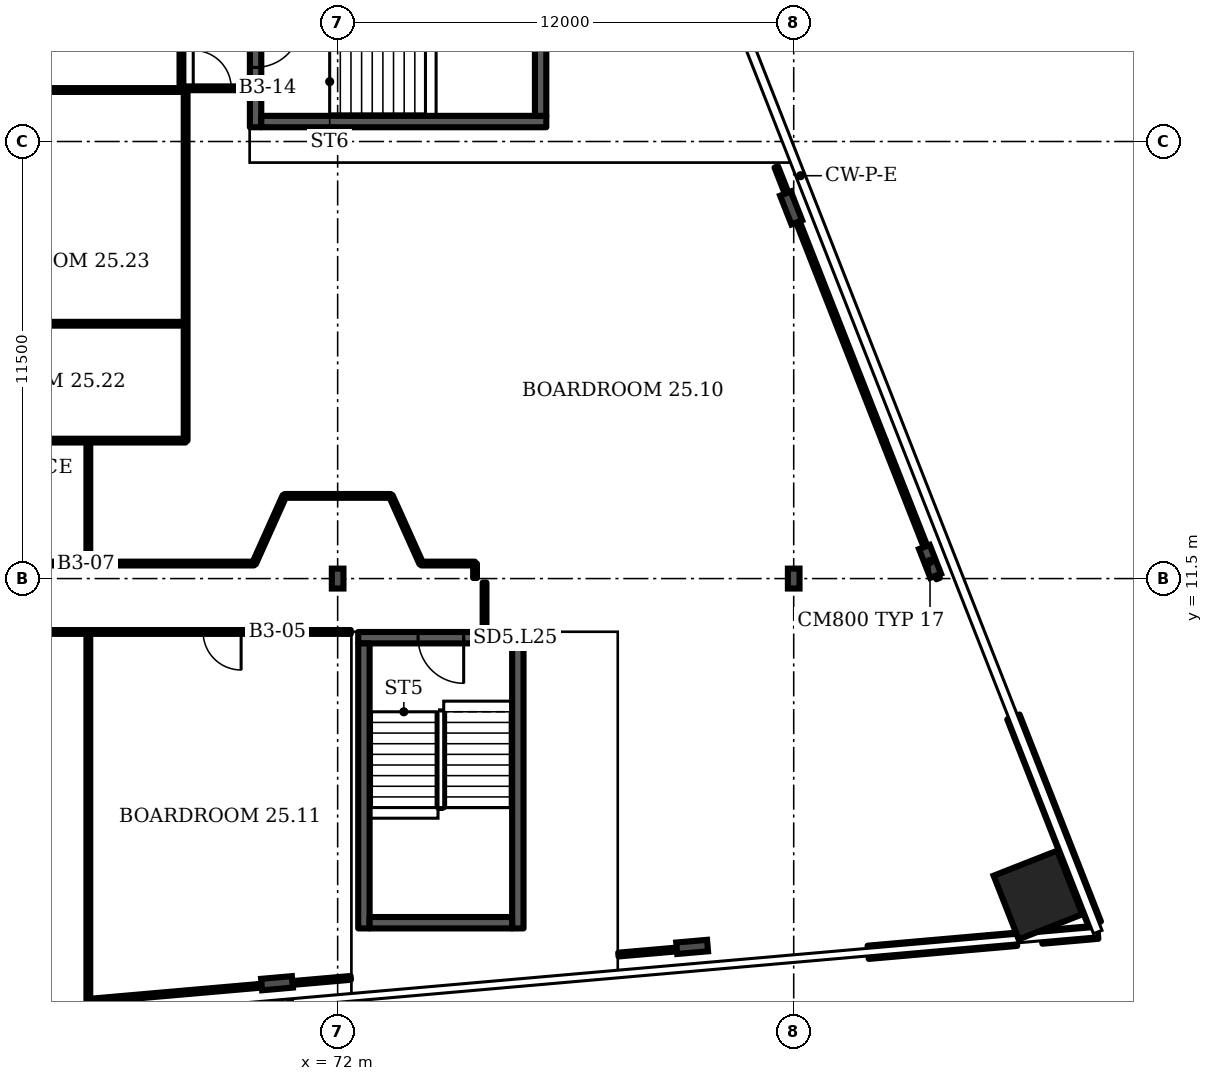
"""IFC4 building model, lengths in metres.
Left out: names, types, materials, properties, quantities, classifications, styles, units other than length and angle.
Written with IfcOpenShell. Run it as: python <this file> out.ifc"""

import sys

from ifc_helpers import new_model, si_unit, direction, frame, frame_2d, origin, origin_2d, place, context, subcontext, project, spatial, rectangle, i_section, extrude, element, fill, save


model = new_model("IFC4")
c1 = context("Model", 3, precision=1e-05, world=origin(), true_north=direction((0.0, 1.0)))
c2 = subcontext(c1, "Body", "Model", "MODEL_VIEW")
j1 = project(units=[si_unit("LENGTHUNIT", "METRE"), si_unit("PLANEANGLEUNIT", "RADIAN")], contexts=[c1])
p1 = place(None, origin())
s1 = spatial("IfcSite", under=j1, at=p1, CompositionType="ELEMENT")
p2 = place(p1, origin())
s2 = spatial("IfcBuilding", under=s1, at=p2, CompositionType="ELEMENT")
p3 = place(p2, frame((0.0, 0.0, 111.1)))
s3 = spatial("IfcBuildingStorey", under=s2, at=p3, CompositionType="ELEMENT", Elevation=111.1)
p4 = place(p3, frame((90.427, 3.174, 0.0), z_axis=(0.0, 0.0, 1.0), x_axis=(-0.365778, 0.930702, 0.0)))
e1 = element("IfcColumn", 1, at=p4, inside=s3, PredefinedType="COLUMN", context=c2, shape_type="SweptSolid", body=[
    extrude(rectangle(XDim=1.8, YDim=1.8, at=origin_2d()), origin(), (0.0, 0.0, 1.0), 3.6),
])
for number, where, z_axis, x_axis in (
    (2, (70.404, 0.853, 0.0), (0.0, 0.0, 1.0), (0.087, -0.996, 0.0)),
    (3, (81.328, 1.808, 0.0), (0.0, 0.0, 1.0), (0.087, -0.996, 0.0)),
    (4, (87.587, 11.952, 0.0), (0.0, 0.0, 1.0), (0.931, 0.366, 0.0)),
    (5, (83.933, 21.251, 0.0), (0.0, 0.0, 1.0), (0.931, 0.366, 0.0)),
):
    element("IfcColumn", number, at=place(p3, frame(where, z_axis=z_axis, x_axis=x_axis)), inside=s3, PredefinedType="COLUMN", context=c2, shape_type="SweptSolid", body=[
        extrude(i_section(OverallWidth=0.303, OverallDepth=0.814, WebThickness=0.021, FlangeThickness=0.04, FilletRadius=0.03, at=origin_2d()), origin(), (0.0, 0.0, 1.0), 3.6),
    ])
for number, where, z_axis, x_axis in (
    (6, (72.0, 11.5, 0.0), (0.0, 0.0, 1.0), (1.0, 0.0, 0.0)),
    (7, (84.0, 11.5, 0.0), (0.0, 0.0, 1.0), (1.0, 0.0, 0.0)),
):
    element("IfcColumn", number, at=place(p3, frame(where, z_axis=z_axis, x_axis=x_axis)), inside=s3, PredefinedType="COLUMN", context=c2, shape_type="SweptSolid", body=[
        extrude(i_section(OverallWidth=0.306, OverallDepth=0.524, WebThickness=0.021, FlangeThickness=0.04, FilletRadius=0.027, at=origin_2d()), origin(), (0.0, 0.0, 1.0), 3.6),
    ])
p5 = place(p3, frame((85.959, 1.667, 0.0), z_axis=(0.0, 0.0, 1.0), x_axis=(0.996194, 0.087167, 0.0)))
e8 = element("IfcWall", 8, at=p5, inside=s3, PredefinedType="SOLIDWALL", context=c2, shape_type="SweptSolid", body=[
    extrude(rectangle(XDim=3.921, YDim=0.35, at=frame_2d((1.96, 0.0))), origin(), (0.0, 0.0, 1.0), 1.0),
])
p6 = place(p3, frame((90.527, 2.066, 0.0), z_axis=(0.0, 0.0, 1.0), x_axis=(0.996198, 0.087157, 0.0)))
e9 = element("IfcWall", 9, at=p6, inside=s3, PredefinedType="SOLIDWALL", context=c2, shape_type="SweptSolid", body=[
    extrude(rectangle(XDim=1.479, YDim=0.35, at=frame_2d((0.74, 0.0))), origin(), (0.0, 0.0, 1.0), 1.0),
])
p7 = place(p3, frame((91.921, 2.414, 0.0), z_axis=(0.0, 0.0, 1.0), x_axis=(-0.36578, 0.930701, 0.0)))
e10 = element("IfcWall", 10, at=p7, inside=s3, PredefinedType="SOLIDWALL", context=c2, shape_type="SweptSolid", body=[
    extrude(rectangle(XDim=5.852, YDim=0.35, at=frame_2d((2.926, 0.0))), origin(), (0.0, 0.0, 1.0), 1.0),
])
p8 = place(p3, frame((72.541, 9.945, 0.0), z_axis=(0.0, 0.0, 1.0), x_axis=(1.0, 0.0, 0.0)))
e11 = element("IfcWall", 11, at=p8, inside=s3, PredefinedType="SHEAR", context=c2, shape_type="SweptSolid", body=[
    extrude(rectangle(XDim=4.35, YDim=0.3, at=frame_2d((2.175, 0.0))), origin(), (0.0, 0.0, 1.0), 3.2),
])
p9 = place(p8, frame((1.575, 0.0, 0.0)))
e12 = element("IfcOpeningElement", 12, at=p9, cuts=e11, PredefinedType="OPENING", context=c2, shape_type="SweptSolid", body=[
    extrude(rectangle(XDim=1.2, YDim=2.1, at=frame_2d((0.6, 1.05))), frame((0.0, 0.16, 0.0), z_axis=(0.0, -1.0, 0.0), x_axis=(1.0, 0.0, 0.0)), (0.0, 0.0, 1.0), 0.32),
])
p10 = place(p3, frame((69.84, 23.375, 0.0), z_axis=(0.0, 0.0, 1.0), x_axis=(0.0, 1.0, 0.0)))
e13 = element("IfcWall", 13, at=p10, inside=s3, PredefinedType="SHEAR", context=c2, shape_type="SweptSolid", body=[
    extrude(rectangle(XDim=4.35, YDim=0.3, at=frame_2d((2.175, 0.0))), origin(), (0.0, 0.0, 1.0), 3.2),
])
p11 = place(p10, frame((1.575, 0.0, 0.0)))
e14 = element("IfcOpeningElement", 14, at=p11, cuts=e13, PredefinedType="OPENING", context=c2, shape_type="SweptSolid", body=[
    extrude(rectangle(XDim=1.2, YDim=2.1, at=frame_2d((0.6, 1.05))), frame((0.0, 0.16, 0.0), z_axis=(0.0, -1.0, 0.0), x_axis=(1.0, 0.0, 0.0)), (0.0, 0.0, 1.0), 0.32),
])
for number, where, z_axis, x_axis in (
    (15, (59.4, 15.13, 0.0), (0.0, 0.0, 1.0), (1.0, 0.0, 0.0)),
    (16, (59.4, 18.205, 0.0), (0.0, 0.0, 1.0), (1.0, 0.0, 0.0)),
    (17, (59.4, 24.355, 0.0), (0.0, 0.0, 1.0), (1.0, 0.0, 0.0)),
):
    element("IfcWall", number, at=place(p3, frame(where, z_axis=z_axis, x_axis=x_axis)), inside=s3, PredefinedType="PARTITIONING", context=c2, shape_type="SweptSolid", body=[
        extrude(rectangle(XDim=8.6, YDim=0.1, at=frame_2d((4.3, 0.0))), origin(), (0.0, 0.0, 1.0), 3.2),
    ])
p12 = place(p3, frame((62.2, 10.095, 0.0), z_axis=(0.0, 0.0, 1.0), x_axis=(1.0, 0.0, 0.0)))
e18 = element("IfcWall", 18, at=p12, inside=s3, PredefinedType="PARTITIONING", context=c2, shape_type="SweptSolid", body=[
    extrude(rectangle(XDim=10.146, YDim=0.1, at=frame_2d((5.073, 0.0))), origin(), (0.0, 0.0, 1.0), 3.2),
])
p13 = place(p12, frame((6.26, 0.0, 0.0)))
e19 = element("IfcOpeningElement", 19, at=p13, cuts=e18, PredefinedType="OPENING", context=c2, shape_type="SweptSolid", body=[
    extrude(rectangle(XDim=1.0, YDim=2.1, at=frame_2d((0.5, 1.05))), frame((0.0, 0.06, 0.0), z_axis=(0.0, -1.0, 0.0), x_axis=(1.0, 0.0, 0.0)), (0.0, 0.0, 1.0), 0.12),
])
p14 = place(p3, frame((62.2, 11.895, 0.0), z_axis=(0.0, 0.0, 1.0), x_axis=(1.0, 0.0, 0.0)))
e20 = element("IfcWall", 20, at=p14, inside=s3, PredefinedType="PARTITIONING", context=c2, shape_type="SweptSolid", body=[
    extrude(rectangle(XDim=7.6, YDim=0.1, at=frame_2d((3.8, 0.0))), origin(), (0.0, 0.0, 1.0), 3.2),
])
p15 = place(p14, frame((1.22, 0.0, 0.0)))
e21 = element("IfcOpeningElement", 21, at=p15, cuts=e20, PredefinedType="OPENING", context=c2, shape_type="SweptSolid", body=[
    extrude(rectangle(XDim=1.0, YDim=2.1, at=frame_2d((0.5, 1.05))), frame((0.0, 0.06, 0.0), z_axis=(0.0, -1.0, 0.0), x_axis=(1.0, 0.0, 0.0)), (0.0, 0.0, 1.0), 0.12),
])
p16 = place(p3, frame((65.44, 0.39, 0.0), z_axis=(0.0, 0.0, 1.0), x_axis=(0.996214, 0.086949, 0.0)))
e22 = element("IfcWall", 22, at=p16, inside=s3, PredefinedType="PARTITIONING", context=c2, shape_type="SweptSolid", body=[
    extrude(rectangle(XDim=4.487, YDim=0.1, at=frame_2d((2.244, 0.0))), origin(), (0.0, 0.0, 1.0), 2.58),
])
p17 = place(p3, frame((65.44, 0.39, 0.0), z_axis=(0.0, 0.0, 1.0), x_axis=(0.0, 1.0, 0.0)))
e23 = element("IfcWall", 23, at=p17, inside=s3, PredefinedType="PARTITIONING", context=c2, shape_type="SweptSolid", body=[
    extrude(rectangle(XDim=9.705, YDim=0.1, at=frame_2d((4.853, 0.0))), origin(), (0.0, 0.0, 1.0), 3.2),
])
p18 = place(p3, frame((65.44, 11.895, 0.0), z_axis=(0.0, 0.0, 1.0), x_axis=(0.0, 1.0, 0.0)))
e24 = element("IfcWall", 24, at=p18, inside=s3, PredefinedType="PARTITIONING", context=c2, shape_type="SweptSolid", body=[
    extrude(rectangle(XDim=3.235, YDim=0.1, at=frame_2d((1.617, 0.0))), origin(), (0.0, 0.0, 1.0), 3.2),
])
p19 = place(p3, frame((67.89, 24.4, 0.0), z_axis=(0.0, 0.0, 1.0), x_axis=(0.0, 1.0, 0.0)))
e25 = element("IfcWall", 25, at=p19, inside=s3, PredefinedType="PARTITIONING", context=c2, shape_type="SweptSolid", body=[
    extrude(rectangle(XDim=4.485, YDim=0.1, at=frame_2d((2.243, 0.0))), origin(), (0.0, 0.0, 1.0), 3.2),
])
p20 = place(p3, frame((68.0, 24.4, 0.0), z_axis=(0.0, 0.0, 1.0), x_axis=(1.0, 0.0, 0.0)))
e26 = element("IfcWall", 26, at=p20, inside=s3, PredefinedType="PARTITIONING", context=c2, shape_type="SweptSolid", body=[
    extrude(rectangle(XDim=1.67, YDim=0.1, at=frame_2d((0.835, 0.0))), origin(), (0.0, 0.0, 1.0), 3.2),
])
p21 = place(p20, frame((0.2, 0.0, 0.0)))
e27 = element("IfcOpeningElement", 27, at=p21, cuts=e26, PredefinedType="OPENING", context=c2, shape_type="SweptSolid", body=[
    extrude(rectangle(XDim=1.0, YDim=2.1, at=frame_2d((0.5, 1.05))), frame((0.0, 0.06, 0.0), z_axis=(0.0, -1.0, 0.0), x_axis=(1.0, 0.0, 0.0)), (0.0, 0.0, 1.0), 0.12),
])
p22 = place(p3, frame((68.0, 15.13, 0.0), z_axis=(0.0, 0.0, 1.0), x_axis=(0.0, 1.0, 0.0)))
e28 = element("IfcWall", 28, at=p22, inside=s3, PredefinedType="PARTITIONING", context=c2, shape_type="SweptSolid", body=[
    extrude(rectangle(XDim=9.22, YDim=0.1, at=frame_2d((4.61, 0.0))), origin(), (0.0, 0.0, 1.0), 3.2),
])
p23 = place(p3, frame((69.8, 11.895, 0.0), z_axis=(0.0, 0.0, 1.0), x_axis=(0.409954, 0.912107, 0.0)))
e29 = element("IfcWall", 29, at=p23, inside=s3, PredefinedType="PARTITIONING", context=c2, shape_type="SweptSolid", body=[
    extrude(rectangle(XDim=1.952, YDim=0.1, at=frame_2d((0.976, 0.0))), origin(), (0.0, 0.0, 1.0), 3.2),
])
p24 = place(p3, frame((69.91, 0.78, 0.0), z_axis=(0.0, 0.0, 1.0), x_axis=(0.99619, 0.087259, 0.0)))
e30 = element("IfcWall", 30, at=p24, inside=s3, PredefinedType="PARTITIONING", context=c2, shape_type="SweptSolid", body=[
    extrude(rectangle(XDim=2.445, YDim=0.1, at=frame_2d((1.223, 0.0))), origin(), (0.0, 0.0, 1.0), 2.58),
])
p25 = place(p3, frame((70.6, 13.675, 0.0), z_axis=(0.0, 0.0, 1.0), x_axis=(1.0, 0.0, 0.0)))
e31 = element("IfcWall", 31, at=p25, inside=s3, PredefinedType="PARTITIONING", context=c2, shape_type="SweptSolid", body=[
    extrude(rectangle(XDim=2.8, YDim=0.1, at=frame_2d((1.4, 0.0))), origin(), (0.0, 0.0, 1.0), 3.2),
])
p26 = place(p3, frame((74.2, 11.895, 0.0), z_axis=(0.0, 0.0, 1.0), x_axis=(1.0, 0.0, 0.0)))
e32 = element("IfcWall", 32, at=p26, inside=s3, PredefinedType="PARTITIONING", context=c2, shape_type="SweptSolid", body=[
    extrude(rectangle(XDim=1.415, YDim=0.1, at=frame_2d((0.708, 0.0))), origin(), (0.0, 0.0, 1.0), 3.2),
])
p27 = place(p3, frame((74.2, 11.895, 0.0), z_axis=(0.0, 0.0, 1.0), x_axis=(-0.409954, 0.912107, 0.0)))
e33 = element("IfcWall", 33, at=p27, inside=s3, PredefinedType="PARTITIONING", context=c2, shape_type="SweptSolid", body=[
    extrude(rectangle(XDim=1.952, YDim=0.1, at=frame_2d((0.976, 0.0))), origin(), (0.0, 0.0, 1.0), 3.2),
])
p28 = place(p3, frame((75.615, 11.515, 0.0), z_axis=(0.0, 0.0, 1.0), x_axis=(0.0, 1.0, 0.0)))
e34 = element("IfcWall", 34, at=p28, inside=s3, PredefinedType="PARTITIONING", context=c2, shape_type="SweptSolid", body=[
    extrude(rectangle(XDim=0.38, YDim=0.1, at=frame_2d((0.19, 0.0))), origin(), (0.0, 0.0, 1.0), 3.2),
])
p29 = place(p3, frame((75.865, 10.115, 0.0), z_axis=(0.0, 0.0, 1.0), x_axis=(0.0, 1.0, 0.0)))
e35 = element("IfcWall", 35, at=p29, inside=s3, PredefinedType="PARTITIONING", context=c2, shape_type="SweptSolid", body=[
    extrude(rectangle(XDim=1.28, YDim=0.1, at=frame_2d((0.64, 0.0))), origin(), (0.0, 0.0, 1.0), 3.2),
])
p30 = place(p3, frame((79.386, 1.607, 0.0), z_axis=(0.0, 0.0, 1.0), x_axis=(0.996228, 0.08682, 0.0)))
e36 = element("IfcWall", 36, at=p30, inside=s3, PredefinedType="PARTITIONING", context=c2, shape_type="SweptSolid", body=[
    extrude(rectangle(XDim=1.997, YDim=0.1, at=frame_2d((0.998, 0.0))), origin(), (0.0, 0.0, 1.0), 2.58),
])
p31 = place(p3, frame((86.37, 15.13, 0.0), z_axis=(0.0, 0.0, 1.0), x_axis=(-0.365535, 0.930794, 0.0)))
e37 = element("IfcWall", 37, at=p31, inside=s3, PredefinedType="PARTITIONING", context=c2, shape_type="SweptSolid", body=[
    extrude(rectangle(XDim=7.739, YDim=0.1, at=frame_2d((3.87, 0.0))), origin(), (0.0, 0.0, 1.0), 2.58),
])
p32 = place(p3, frame((87.8, 11.5, 0.0), z_axis=(0.0, 0.0, 1.0), x_axis=(-0.366521, 0.930414, 0.0)))
e38 = element("IfcWall", 38, at=p32, inside=s3, PredefinedType="PARTITIONING", context=c2, shape_type="SweptSolid", body=[
    extrude(rectangle(XDim=3.901, YDim=0.1, at=frame_2d((1.951, 0.0))), origin(), (0.0, 0.0, 1.0), 2.58),
])
for number, where, z_axis, x_axis in (
    (39, (72.691, 2.295, 0.0), (0.0, 0.0, 1.0), (0.0, 1.0, 0.0)),
    (40, (76.741, 2.295, 0.0), (0.0, 0.0, 1.0), (0.0, 1.0, 0.0)),
):
    element("IfcWall", number, at=place(p3, frame(where, z_axis=z_axis, x_axis=x_axis)), inside=s3, PredefinedType="SHEAR", context=c2, shape_type="SweptSolid", body=[
        extrude(rectangle(XDim=7.5, YDim=0.3, at=frame_2d((3.75, 0.0))), origin(), (0.0, 0.0, 1.0), 3.2),
    ])
p33 = place(p3, frame((72.841, 2.445, 0.0), z_axis=(0.0, 0.0, 1.0), x_axis=(1.0, 0.0, 0.0)))
e41 = element("IfcWall", 41, at=p33, inside=s3, PredefinedType="SHEAR", context=c2, shape_type="SweptSolid", body=[
    extrude(rectangle(XDim=3.75, YDim=0.3, at=frame_2d((1.875, 0.0))), origin(), (0.0, 0.0, 1.0), 3.2),
])
p34 = place(p3, frame((69.99, 23.525, 0.0), z_axis=(0.0, 0.0, 1.0), x_axis=(1.0, 0.0, 0.0)))
e42 = element("IfcWall", 42, at=p34, inside=s3, PredefinedType="SHEAR", context=c2, shape_type="SweptSolid", body=[
    extrude(rectangle(XDim=7.5, YDim=0.3, at=frame_2d((3.75, 0.0))), origin(), (0.0, 0.0, 1.0), 3.2),
])
p35 = place(p3, frame((77.34, 23.675, 0.0), z_axis=(0.0, 0.0, 1.0), x_axis=(0.0, 1.0, 0.0)))
e43 = element("IfcWall", 43, at=p35, inside=s3, PredefinedType="SHEAR", context=c2, shape_type="SweptSolid", body=[
    extrude(rectangle(XDim=3.75, YDim=0.3, at=frame_2d((1.875, 0.0))), origin(), (0.0, 0.0, 1.0), 3.2),
])
p36 = place(p9, origin())
e44 = element("IfcDoor", 44, at=p36, inside=s3, OperationType="SINGLE_SWING_RIGHT", PredefinedType="DOOR", context=c2, shape_type="SweptSolid", body=[
    extrude(rectangle(XDim=1.2, YDim=2.1, at=frame_2d((0.6, 1.05))), frame((0.0, 0.025, 0.0), z_axis=(0.0, -1.0, 0.0), x_axis=(1.0, 0.0, 0.0)), (0.0, 0.0, 1.0), 0.05),
])
fill(e12, e44)
p37 = place(p11, origin())
e45 = element("IfcDoor", 45, at=p37, inside=s3, OperationType="SINGLE_SWING_RIGHT", PredefinedType="DOOR", context=c2, shape_type="SweptSolid", body=[
    extrude(rectangle(XDim=1.2, YDim=2.1, at=frame_2d((0.6, 1.05))), frame((0.0, 0.025, 0.0), z_axis=(0.0, -1.0, 0.0), x_axis=(1.0, 0.0, 0.0)), (0.0, 0.0, 1.0), 0.05),
])
fill(e14, e45)
p38 = place(p13, origin())
e46 = element("IfcDoor", 46, at=p38, inside=s3, OperationType="SINGLE_SWING_RIGHT", PredefinedType="DOOR", context=c2, shape_type="SweptSolid", body=[
    extrude(rectangle(XDim=1.0, YDim=2.1, at=frame_2d((0.5, 1.05))), frame((0.0, 0.025, 0.0), z_axis=(0.0, -1.0, 0.0), x_axis=(1.0, 0.0, 0.0)), (0.0, 0.0, 1.0), 0.05),
])
fill(e19, e46)
p39 = place(p21, origin())
e47 = element("IfcDoor", 47, at=p39, inside=s3, OperationType="SINGLE_SWING_LEFT", PredefinedType="DOOR", context=c2, shape_type="SweptSolid", body=[
    extrude(rectangle(XDim=1.0, YDim=2.1, at=frame_2d((0.5, 1.05))), frame((0.0, 0.025, 0.0), z_axis=(0.0, -1.0, 0.0), x_axis=(1.0, 0.0, 0.0)), (0.0, 0.0, 1.0), 0.05),
])
fill(e27, e47)
save(model, sys.argv[1])
